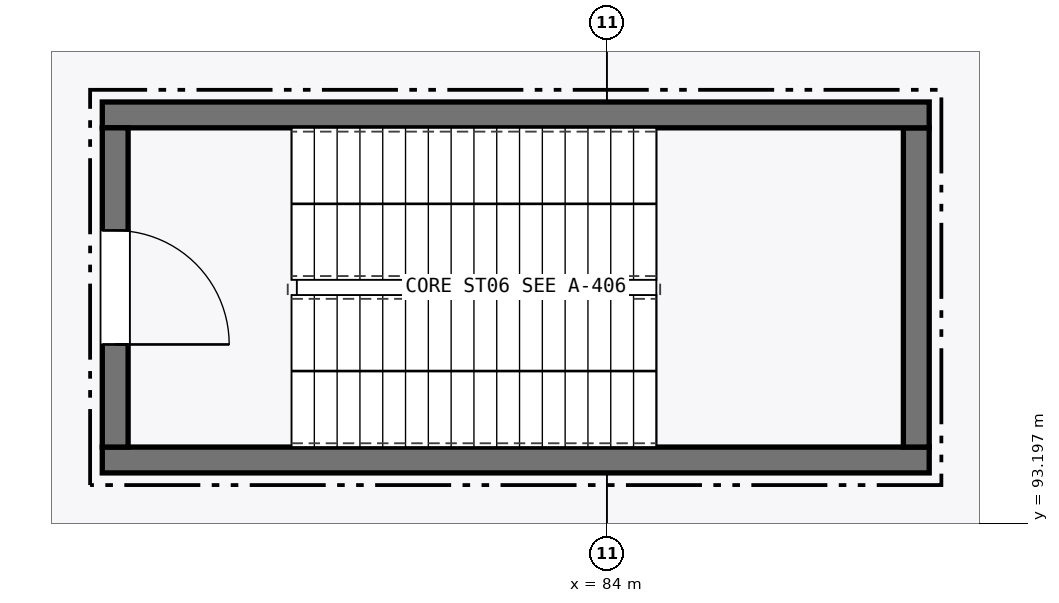
"""IFC4 building model, lengths in metres.
Left out: names, types, materials, properties, quantities, classifications, styles, units other than length and angle.
Written with IfcOpenShell. Run it as: python <this file> out.ifc"""

import sys

from ifc_helpers import new_model, si_unit, direction, frame, frame_2d, origin, place, context, subcontext, project, spatial, rectangle, extrude, element, fill, save


model = new_model("IFC4")
c1 = context("Model", 3, precision=1e-05, world=origin(), true_north=direction((0.0, 1.0)))
c2 = subcontext(c1, "Body", "Model", "MODEL_VIEW")
j1 = project(units=[si_unit("LENGTHUNIT", "METRE"), si_unit("PLANEANGLEUNIT", "RADIAN")], contexts=[c1])
p1 = place(None, origin())
s1 = spatial("IfcSite", under=j1, at=p1, CompositionType="ELEMENT")
p2 = place(p1, origin())
s2 = spatial("IfcBuilding", under=s1, at=p2, CompositionType="ELEMENT")
p3 = place(p2, frame((0.0, 0.0, 11.4)))
s3 = spatial("IfcBuildingStorey", under=s2, at=p3, CompositionType="ELEMENT", Elevation=11.4)
p4 = place(p3, frame((77.36, 94.03, 0.0), z_axis=(0.0, 0.0, 1.0), x_axis=(1.0, 0.0, 0.0)))
e1 = element("IfcWall", 1, at=p4, inside=s3, PredefinedType="SHEAR", context=c2, shape_type="SweptSolid", body=[
    extrude(rectangle(XDim=10.88, YDim=0.34, at=frame_2d((5.44, 0.0))), origin(), (0.0, 0.0, 1.0), 4.845),
])
p5 = place(p3, frame((88.07, 94.2, 0.0), z_axis=(0.0, 0.0, 1.0), x_axis=(0.0, 1.0, 0.0)))
e2 = element("IfcWall", 2, at=p5, inside=s3, PredefinedType="SHEAR", context=c2, shape_type="SweptSolid", body=[
    extrude(rectangle(XDim=4.2, YDim=0.34, at=frame_2d((2.1, 0.0))), origin(), (0.0, 0.0, 1.0), 4.845),
])
p6 = place(p3, frame((88.24, 98.57, 0.0), z_axis=(0.0, 0.0, 1.0), x_axis=(-1.0, 0.0, 0.0)))
e3 = element("IfcWall", 3, at=p6, inside=s3, PredefinedType="SHEAR", context=c2, shape_type="SweptSolid", body=[
    extrude(rectangle(XDim=10.88, YDim=0.34, at=frame_2d((5.44, 0.0))), origin(), (0.0, 0.0, 1.0), 4.845),
])
p7 = place(p3, frame((77.53, 98.4, 0.0), z_axis=(0.0, 0.0, 1.0), x_axis=(0.0, -1.0, 0.0)))
e4 = element("IfcWall", 4, at=p7, inside=s3, PredefinedType="SHEAR", context=c2, shape_type="SweptSolid", body=[
    extrude(rectangle(XDim=4.2, YDim=0.34, at=frame_2d((2.1, 0.0))), origin(), (0.0, 0.0, 1.0), 4.845),
])
p8 = place(p7, frame((1.35, 0.0, 0.0)))
e5 = element("IfcOpeningElement", 5, at=p8, cuts=e4, PredefinedType="OPENING", context=c2, shape_type="SweptSolid", body=[
    extrude(rectangle(XDim=1.5, YDim=2.15, at=frame_2d((0.75, 1.075))), frame((0.0, 0.18, 0.0), z_axis=(0.0, -1.0, 0.0), x_axis=(1.0, 0.0, 0.0)), (0.0, 0.0, 1.0), 0.36),
])
p9 = place(p8, origin())
e6 = element("IfcDoor", 6, at=p9, inside=s3, OperationType="SINGLE_SWING_RIGHT", PredefinedType="DOOR", context=c2, shape_type="SweptSolid", body=[
    extrude(rectangle(XDim=1.5, YDim=2.15, at=frame_2d((0.75, 1.075))), frame((0.0, 0.025, 0.0), z_axis=(0.0, -1.0, 0.0), x_axis=(1.0, 0.0, 0.0)), (0.0, 0.0, 1.0), 0.05),
])
fill(e5, e6)
save(model, sys.argv[1])
